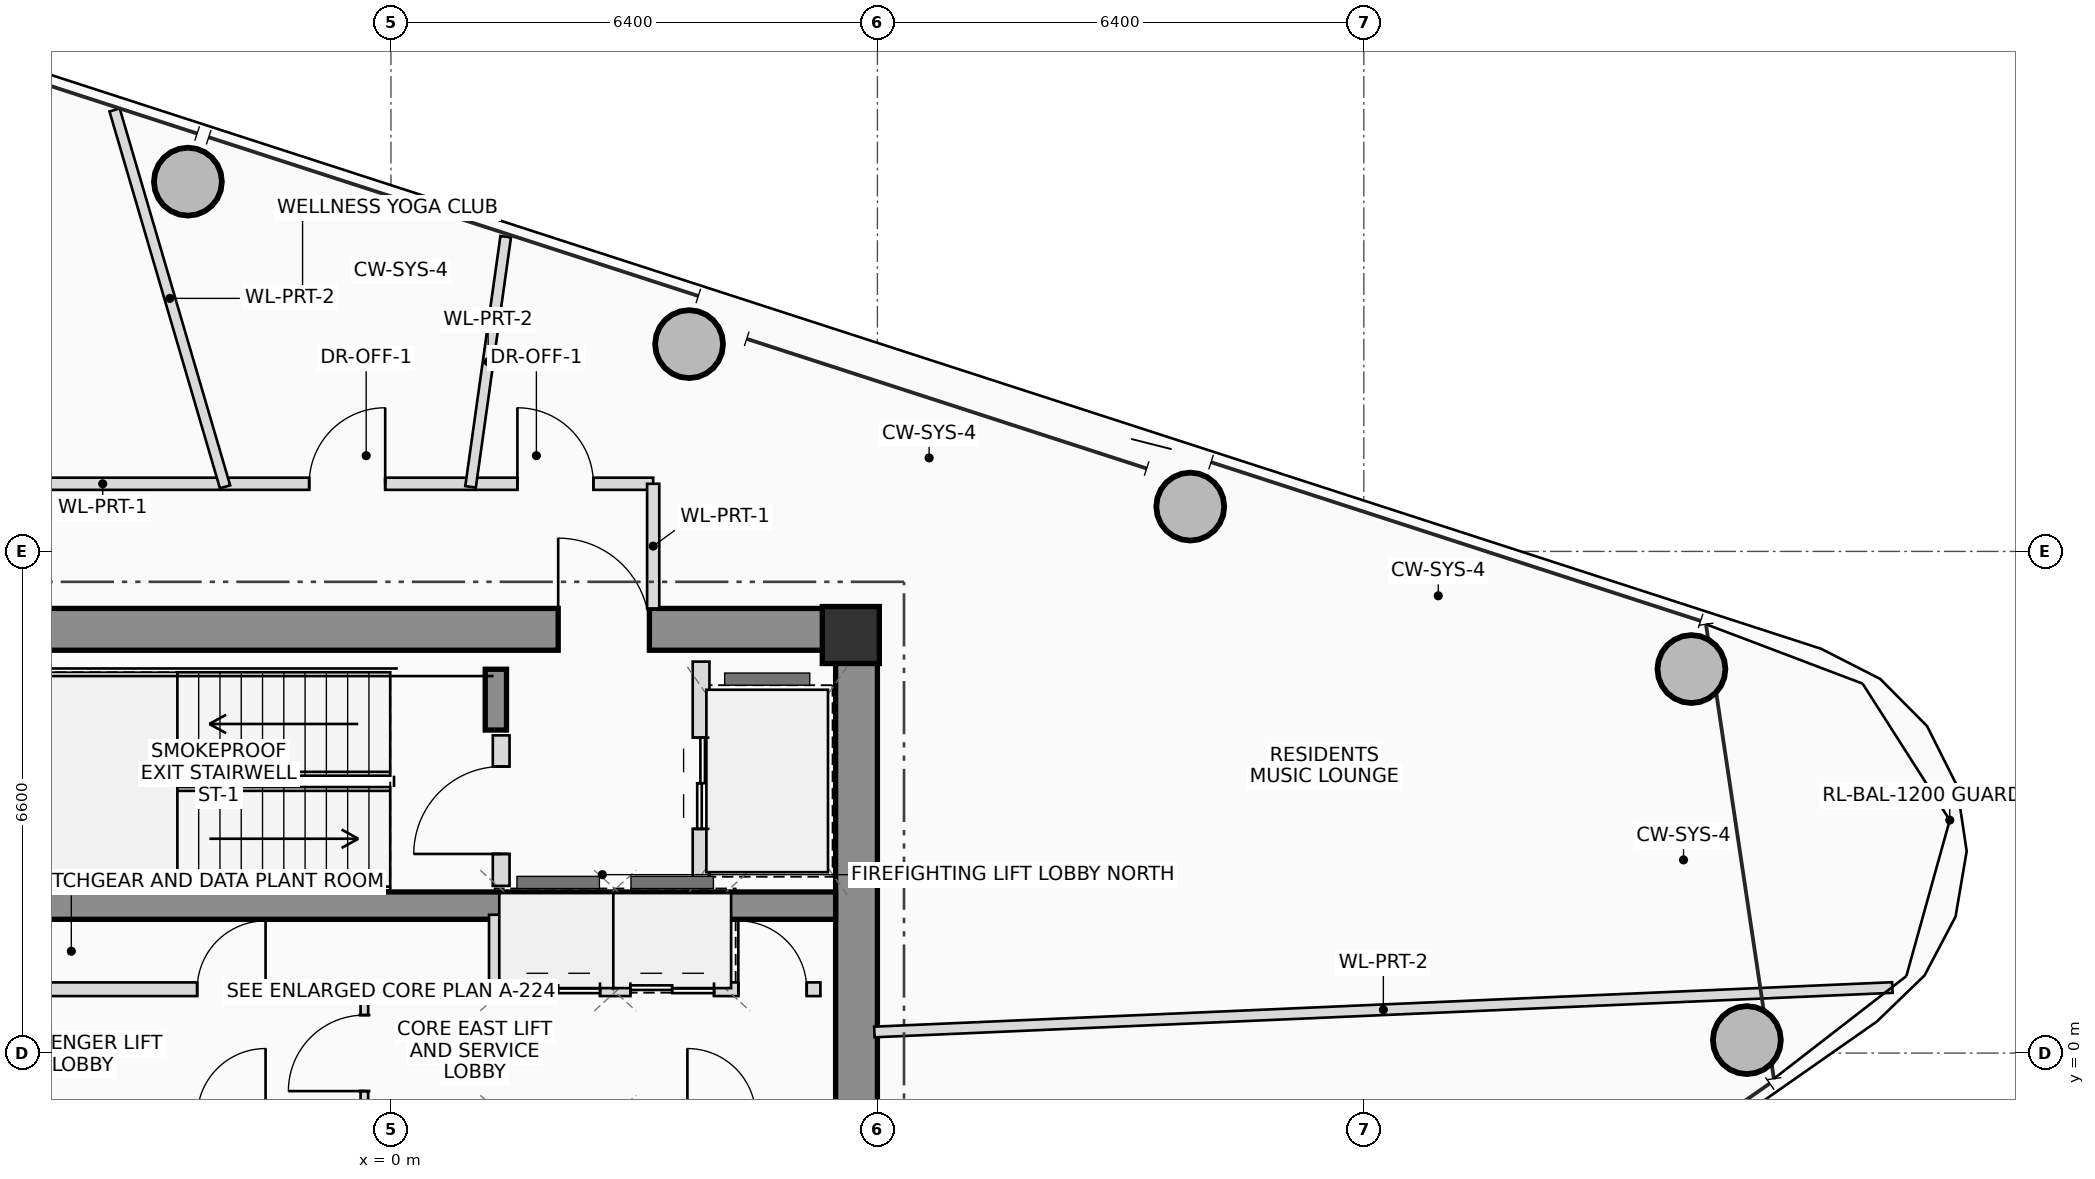
"""IFC4 building model, lengths in metres.
Left out: names, types, materials, properties, quantities, classifications, styles, units other than length and angle.
Written with IfcOpenShell. Run it as: python <this file> out.ifc"""

import sys

from ifc_helpers import new_model, si_unit, direction, frame, frame_2d, origin, origin_2d, place, context, subcontext, project, spatial, rectangle, hollow_circle, extrude, source, transform, mapped, element, fill, save


model = new_model("IFC4")
c1 = context("Model", 3, precision=1e-05, world=origin(), true_north=direction((0.0, 1.0)))
c2 = subcontext(c1, "Body", "Model", "MODEL_VIEW")
j1 = project(units=[si_unit("LENGTHUNIT", "METRE"), si_unit("PLANEANGLEUNIT", "RADIAN")], contexts=[c1])
p1 = place(None, origin())
s1 = spatial("IfcSite", under=j1, at=p1, CompositionType="ELEMENT")
p2 = place(p1, origin())
s2 = spatial("IfcBuilding", under=s1, at=p2, CompositionType="ELEMENT")
p3 = place(p2, frame((0.0, 0.0, 260.95)))
s3 = spatial("IfcBuildingStorey", under=s2, at=p3, CompositionType="ELEMENT", Elevation=260.95)
m1 = source(origin(), c2, "Body", "SweptSolid", [
    extrude(rectangle(XDim=0.75, YDim=0.75, at=origin_2d()), origin(), (0.0, 0.0, 1.0), 3.4),
])
p4 = place(p3, frame((6.05, 5.5, 0.0), z_axis=(0.0, 0.0, 1.0), x_axis=(1.0, 0.0, 0.0)))
e1 = element("IfcColumn", 1, at=p4, inside=s3, PredefinedType="COLUMN", context=c2, shape_type="MappedRepresentation", body=[
    mapped(m1, transform((0.0, 0.0, 0.0), scale=1.0)),
])
p5 = place(p3, frame((-6.4, 5.575, 0.0), z_axis=(0.0, 0.0, 1.0), x_axis=(1.0, 0.0, 0.0)))
e2 = element("IfcWall", 2, at=p5, inside=s3, PredefinedType="SHEAR", context=c2, shape_type="SweptSolid", body=[
    extrude(rectangle(XDim=12.8, YDim=0.55, at=frame_2d((6.4, 0.0))), origin(), (0.0, 0.0, 1.0), 3.4),
])
p6 = place(p5, frame((8.6, 0.0, 0.0)))
e3 = element("IfcOpeningElement", 3, at=p6, cuts=e2, PredefinedType="OPENING", context=c2, shape_type="SweptSolid", body=[
    extrude(rectangle(XDim=1.2, YDim=2.2, at=frame_2d((0.6, 1.1))), frame((0.0, 0.285, 0.0), z_axis=(0.0, -1.0, 0.0), x_axis=(1.0, 0.0, 0.0)), (0.0, 0.0, 1.0), 0.57),
])
p7 = place(p3, frame((6.125, -5.3, 0.0), z_axis=(0.0, 0.0, 1.0), x_axis=(0.0, 1.0, 0.0)))
e4 = element("IfcWall", 4, at=p7, inside=s3, PredefinedType="SHEAR", context=c2, shape_type="SweptSolid", body=[
    extrude(rectangle(XDim=10.6, YDim=0.55, at=frame_2d((5.3, 0.0))), origin(), (0.0, 0.0, 1.0), 3.4),
])
p8 = place(p3, frame((-5.85, 1.94, 0.0), z_axis=(0.0, 0.0, 1.0), x_axis=(1.0, 0.0, 0.0)))
e5 = element("IfcWall", 5, at=p8, inside=s3, PredefinedType="SHEAR", context=c2, shape_type="SweptSolid", body=[
    extrude(rectangle(XDim=11.7, YDim=0.36, at=frame_2d((5.85, 0.0))), origin(), (0.0, 0.0, 1.0), 3.4),
])
p9 = place(p3, frame((1.38, 4.25, 0.0), z_axis=(0.0, 0.0, 1.0), x_axis=(0.0, 1.0, 0.0)))
e6 = element("IfcWall", 6, at=p9, inside=s3, PredefinedType="SHEAR", context=c2, shape_type="SweptSolid", body=[
    extrude(rectangle(XDim=0.8, YDim=0.28, at=frame_2d((0.4, 0.0))), origin(), (0.0, 0.0, 1.0), 3.4),
])
m2 = source(origin(), c2, "Body", "SweptSolid", [
    extrude(hollow_circle(Radius=0.45, WallThickness=0.032, at=origin_2d()), origin(), (0.0, 0.0, 1.0), 3.4),
])
for number, where, z_axis, x_axis in (
    (7, (17.84, 0.171, 0.0), (0.0, 0.0, 1.0), (1.0, 0.0, 0.0)),
    (8, (17.11, 5.052, 0.0), (0.0, 0.0, 1.0), (1.0, 0.0, 0.0)),
    (9, (10.516, 7.19, 0.0), (0.0, 0.0, 1.0), (1.0, 0.0, 0.0)),
    (10, (3.922, 9.327, 0.0), (0.0, 0.0, 1.0), (1.0, 0.0, 0.0)),
    (11, (-2.672, 11.465, 0.0), (0.0, 0.0, 1.0), (1.0, 0.0, 0.0)),
):
    element("IfcColumn", number, at=place(p3, frame(where, z_axis=z_axis, x_axis=x_axis)), inside=s3, PredefinedType="COLUMN", context=c2, shape_type="MappedRepresentation", body=[
        mapped(m2, transform((0.0, 0.0, 0.0), scale=1.0)),
    ])
p10 = place(p3, frame((1.45, 2.2, 0.0), z_axis=(0.0, 0.0, 1.0), x_axis=(0.0, 1.0, 0.0)))
e12 = element("IfcWall", 12, at=p10, inside=s3, PredefinedType="PLUMBINGWALL", context=c2, shape_type="SweptSolid", body=[
    extrude(rectangle(XDim=1.98, YDim=0.22, at=frame_2d((0.99, 0.0))), origin(), (0.0, 0.0, 1.0), 3.2),
])
p11 = place(p10, frame((0.42, 0.0, 0.0)))
e13 = element("IfcOpeningElement", 13, at=p11, cuts=e12, PredefinedType="OPENING", context=c2, shape_type="SweptSolid", body=[
    extrude(rectangle(XDim=1.15, YDim=2.15, at=frame_2d((0.575, 1.075))), frame((0.0, 0.12, 0.0), z_axis=(0.0, -1.0, 0.0), x_axis=(1.0, 0.0, 0.0)), (0.0, 0.0, 1.0), 0.24),
])
p12 = place(p3, frame((4.08, 2.2, 0.0), z_axis=(0.0, 0.0, 1.0), x_axis=(0.0, 1.0, 0.0)))
e14 = element("IfcWall", 14, at=p12, inside=s3, PredefinedType="PLUMBINGWALL", context=c2, shape_type="SweptSolid", body=[
    extrude(rectangle(XDim=2.95, YDim=0.22, at=frame_2d((1.475, 0.0))), origin(), (0.0, 0.0, 1.0), 3.2),
])
p13 = place(p12, frame((0.75, 0.0, 0.0)))
e15 = element("IfcOpeningElement", 15, at=p13, cuts=e14, PredefinedType="OPENING", context=c2, shape_type="SweptSolid", body=[
    extrude(rectangle(XDim=1.2, YDim=2.25, at=frame_2d((0.6, 1.125))), frame((0.0, 0.12, 0.0), z_axis=(0.0, -1.0, 0.0), x_axis=(1.0, 0.0, 0.0)), (0.0, 0.0, 1.0), 0.24),
])
p14 = place(p3, frame((-0.35, -0.84, 0.0), z_axis=(0.0, 0.0, 1.0), x_axis=(0.0, 1.0, 0.0)))
e16 = element("IfcWall", 16, at=p14, inside=s3, PredefinedType="PARTITIONING", context=c2, shape_type="SweptSolid", body=[
    extrude(rectangle(XDim=1.68, YDim=0.1, at=frame_2d((0.84, 0.0))), origin(), (0.0, 0.0, 1.0), 3.2),
])
p15 = place(p14, frame((0.34, 0.0, 0.0)))
e17 = element("IfcOpeningElement", 17, at=p15, cuts=e16, PredefinedType="OPENING", context=c2, shape_type="SweptSolid", body=[
    extrude(rectangle(XDim=1.0, YDim=2.25, at=frame_2d((0.5, 1.125))), frame((0.0, 0.06, 0.0), z_axis=(0.0, -1.0, 0.0), x_axis=(1.0, 0.0, 0.0)), (0.0, 0.0, 1.0), 0.12),
])
for number, where, z_axis, x_axis in (
    (18, (1.38, 0.84, 0.0), (0.0, 0.0, 1.0), (0.0, 1.0, 0.0)),
    (19, (3.02, 0.84, 0.0), (0.0, 0.0, 1.0), (0.0, 1.0, 0.0)),
    (20, (4.38, 0.84, 0.0), (0.0, 0.0, 1.0), (0.0, 1.0, 0.0)),
):
    element("IfcWall", number, at=place(p3, frame(where, z_axis=z_axis, x_axis=x_axis)), inside=s3, PredefinedType="PLUMBINGWALL", context=c2, shape_type="SweptSolid", body=[
        extrude(rectangle(XDim=0.98, YDim=0.18, at=frame_2d((0.49, 0.0))), origin(), (0.0, 0.0, 1.0), 3.2),
    ])
p16 = place(p3, frame((-5.68, 0.84, 0.0), z_axis=(0.0, 0.0, 1.0), x_axis=(1.0, 0.0, 0.0)))
e21 = element("IfcWall", 21, at=p16, inside=s3, PredefinedType="PLUMBINGWALL", context=c2, shape_type="SweptSolid", body=[
    extrude(rectangle(XDim=11.33, YDim=0.18, at=frame_2d((5.665, 0.0))), origin(), (0.0, 0.0, 1.0), 3.2),
])
p17 = place(p16, frame((3.13, 0.0, 0.0)))
e22 = element("IfcOpeningElement", 22, at=p17, cuts=e21, PredefinedType="OPENING", context=c2, shape_type="SweptSolid", body=[
    extrude(rectangle(XDim=0.9, YDim=2.05, at=frame_2d((0.45, 1.025))), frame((0.0, 0.1, 0.0), z_axis=(0.0, -1.0, 0.0), x_axis=(1.0, 0.0, 0.0)), (0.0, 0.0, 1.0), 0.2),
])
p18 = place(p16, frame((7.33, 0.0, 0.0)))
e23 = element("IfcOpeningElement", 23, at=p18, cuts=e21, PredefinedType="OPENING", context=c2, shape_type="SweptSolid", body=[
    extrude(rectangle(XDim=1.1, YDim=2.2, at=frame_2d((0.55, 1.1))), frame((0.0, 0.1, 0.0), z_axis=(0.0, -1.0, 0.0), x_axis=(1.0, 0.0, 0.0)), (0.0, 0.0, 1.0), 0.2),
])
p19 = place(p16, frame((8.83, 0.0, 0.0)))
e24 = element("IfcOpeningElement", 24, at=p19, cuts=e21, PredefinedType="OPENING", context=c2, shape_type="SweptSolid", body=[
    extrude(rectangle(XDim=1.1, YDim=2.2, at=frame_2d((0.55, 1.1))), frame((0.0, 0.1, 0.0), z_axis=(0.0, -1.0, 0.0), x_axis=(1.0, 0.0, 0.0)), (0.0, 0.0, 1.0), 0.2),
])
p20 = place(p16, frame((10.25, 0.0, 0.0)))
e25 = element("IfcOpeningElement", 25, at=p20, cuts=e21, PredefinedType="OPENING", context=c2, shape_type="SweptSolid", body=[
    extrude(rectangle(XDim=0.9, YDim=2.05, at=frame_2d((0.45, 1.025))), frame((0.0, 0.1, 0.0), z_axis=(0.0, -1.0, 0.0), x_axis=(1.0, 0.0, 0.0)), (0.0, 0.0, 1.0), 0.2),
])
p21 = place(p3, frame((-6.36, 7.49, 0.0), z_axis=(0.0, 0.0, 1.0), x_axis=(1.0, 0.0, 0.0)))
e26 = element("IfcWall", 26, at=p21, inside=s3, PredefinedType="PARTITIONING", context=c2, shape_type="SweptSolid", body=[
    extrude(rectangle(XDim=9.81, YDim=0.16, at=frame_2d((4.905, 0.0))), origin(), (0.0, 0.0, 1.0), 2.605),
])
p22 = place(p21, frame((5.284, 0.0, 0.0)))
e27 = element("IfcOpeningElement", 27, at=p22, cuts=e26, PredefinedType="OPENING", context=c2, shape_type="SweptSolid", body=[
    extrude(rectangle(XDim=1.0, YDim=2.25, at=frame_2d((0.5, 1.125))), frame((0.0, 0.09, 0.0), z_axis=(0.0, -1.0, 0.0), x_axis=(1.0, 0.0, 0.0)), (0.0, 0.0, 1.0), 0.18),
])
p23 = place(p21, frame((8.023, 0.0, 0.0)))
e28 = element("IfcOpeningElement", 28, at=p23, cuts=e26, PredefinedType="OPENING", context=c2, shape_type="SweptSolid", body=[
    extrude(rectangle(XDim=1.0, YDim=2.25, at=frame_2d((0.5, 1.125))), frame((0.0, 0.09, 0.0), z_axis=(0.0, -1.0, 0.0), x_axis=(1.0, 0.0, 0.0)), (0.0, 0.0, 1.0), 0.18),
])
p24 = place(p3, frame((3.45, 7.49, 0.0), z_axis=(0.0, 0.0, 1.0), x_axis=(0.0, -1.0, 0.0)))
e29 = element("IfcWall", 29, at=p24, inside=s3, PredefinedType="PARTITIONING", context=c2, shape_type="SweptSolid", body=[
    extrude(rectangle(XDim=1.64, YDim=0.16, at=frame_2d((0.82, 0.0))), origin(), (0.0, 0.0, 1.0), 2.805),
])
p25 = place(p3, frame((6.36, 0.278, 0.0), z_axis=(0.0, 0.0, 1.0), x_axis=(0.999047617824, 0.043633213494, 0.0)))
e30 = element("IfcWall", 30, at=p25, inside=s3, PredefinedType="PARTITIONING", context=c2, shape_type="SweptSolid", body=[
    extrude(rectangle(XDim=13.406, YDim=0.14, at=frame_2d((6.703, 0.0))), origin(), (0.0, 0.0, 1.0), 2.605),
])
p26 = place(p3, frame((1.047, 7.45, 0.0), z_axis=(0.0, 0.0, 1.0), x_axis=(0.13916814145, 0.990268765743, 0.0)))
e31 = element("IfcWall", 31, at=p26, inside=s3, PredefinedType="PARTITIONING", context=c2, shape_type="SweptSolid", body=[
    extrude(rectangle(XDim=3.323, YDim=0.14, at=frame_2d((1.661, 0.0))), origin(), (0.0, 0.0, 1.0), 2.765),
])
p27 = place(p3, frame((-2.183, 7.45, 0.0), z_axis=(0.0, 0.0, 1.0), x_axis=(-0.281242676509, 0.95963667964, 0.0)))
e32 = element("IfcWall", 32, at=p27, inside=s3, PredefinedType="PARTITIONING", context=c2, shape_type="SweptSolid", body=[
    extrude(rectangle(XDim=5.167, YDim=0.14, at=frame_2d((2.583, 0.0))), origin(), (0.0, 0.0, 1.0), 2.605),
])
p28 = place(p6, origin())
e33 = element("IfcDoor", 33, at=p28, inside=s3, OperationType="SINGLE_SWING_LEFT", PredefinedType="DOOR", context=c2, shape_type="SweptSolid", body=[
    extrude(rectangle(XDim=1.2, YDim=2.2, at=frame_2d((0.6, 1.1))), frame((0.0, 0.025, 0.0), z_axis=(0.0, -1.0, 0.0), x_axis=(1.0, 0.0, 0.0)), (0.0, 0.0, 1.0), 0.05),
])
fill(e3, e33)
p29 = place(p11, origin())
e34 = element("IfcDoor", 34, at=p29, inside=s3, OperationType="SINGLE_SWING_LEFT", PredefinedType="DOOR", context=c2, shape_type="SweptSolid", body=[
    extrude(rectangle(XDim=1.15, YDim=2.15, at=frame_2d((0.575, 1.075))), frame((0.0, 0.025, 0.0), z_axis=(0.0, -1.0, 0.0), x_axis=(1.0, 0.0, 0.0)), (0.0, 0.0, 1.0), 0.05),
])
fill(e13, e34)
p30 = place(p13, origin())
e35 = element("IfcDoor", 35, at=p30, inside=s3, OperationType="DOUBLE_DOOR_SLIDING", PredefinedType="DOOR", context=c2, shape_type="SweptSolid", body=[
    extrude(rectangle(XDim=1.2, YDim=2.25, at=frame_2d((0.6, 1.125))), frame((0.0, 0.025, 0.0), z_axis=(0.0, -1.0, 0.0), x_axis=(1.0, 0.0, 0.0)), (0.0, 0.0, 1.0), 0.05),
])
fill(e15, e35)
p31 = place(p15, origin())
e36 = element("IfcDoor", 36, at=p31, inside=s3, OperationType="SINGLE_SWING_LEFT", PredefinedType="DOOR", context=c2, shape_type="SweptSolid", body=[
    extrude(rectangle(XDim=1.0, YDim=2.25, at=frame_2d((0.5, 1.125))), frame((0.0, 0.025, 0.0), z_axis=(0.0, -1.0, 0.0), x_axis=(1.0, 0.0, 0.0)), (0.0, 0.0, 1.0), 0.05),
])
fill(e17, e36)
p32 = place(p17, origin())
e37 = element("IfcDoor", 37, at=p32, inside=s3, OperationType="SINGLE_SWING_RIGHT", PredefinedType="DOOR", context=c2, shape_type="SweptSolid", body=[
    extrude(rectangle(XDim=0.9, YDim=2.05, at=frame_2d((0.45, 1.025))), frame((0.0, 0.025, 0.0), z_axis=(0.0, -1.0, 0.0), x_axis=(1.0, 0.0, 0.0)), (0.0, 0.0, 1.0), 0.05),
])
fill(e22, e37)
p33 = place(p18, origin())
e38 = element("IfcDoor", 38, at=p33, inside=s3, OperationType="DOUBLE_DOOR_SLIDING", PredefinedType="DOOR", context=c2, shape_type="SweptSolid", body=[
    extrude(rectangle(XDim=1.1, YDim=2.2, at=frame_2d((0.55, 1.1))), frame((0.0, 0.025, 0.0), z_axis=(0.0, -1.0, 0.0), x_axis=(1.0, 0.0, 0.0)), (0.0, 0.0, 1.0), 0.05),
])
fill(e23, e38)
p34 = place(p19, origin())
e39 = element("IfcDoor", 39, at=p34, inside=s3, OperationType="DOUBLE_DOOR_SLIDING", PredefinedType="DOOR", context=c2, shape_type="SweptSolid", body=[
    extrude(rectangle(XDim=1.1, YDim=2.2, at=frame_2d((0.55, 1.1))), frame((0.0, 0.025, 0.0), z_axis=(0.0, -1.0, 0.0), x_axis=(1.0, 0.0, 0.0)), (0.0, 0.0, 1.0), 0.05),
])
fill(e24, e39)
p35 = place(p20, origin())
e40 = element("IfcDoor", 40, at=p35, inside=s3, OperationType="SINGLE_SWING_LEFT", PredefinedType="DOOR", context=c2, shape_type="SweptSolid", body=[
    extrude(rectangle(XDim=0.9, YDim=2.05, at=frame_2d((0.45, 1.025))), frame((0.0, 0.025, 0.0), z_axis=(0.0, -1.0, 0.0), x_axis=(1.0, 0.0, 0.0)), (0.0, 0.0, 1.0), 0.05),
])
fill(e25, e40)
p36 = place(p22, origin())
e41 = element("IfcDoor", 41, at=p36, inside=s3, OperationType="SINGLE_SWING_RIGHT", PredefinedType="DOOR", context=c2, shape_type="SweptSolid", body=[
    extrude(rectangle(XDim=1.0, YDim=2.25, at=frame_2d((0.5, 1.125))), frame((0.0, 0.025, 0.0), z_axis=(0.0, -1.0, 0.0), x_axis=(1.0, 0.0, 0.0)), (0.0, 0.0, 1.0), 0.05),
])
fill(e27, e41)
p37 = place(p23, origin())
e42 = element("IfcDoor", 42, at=p37, inside=s3, OperationType="SINGLE_SWING_LEFT", PredefinedType="DOOR", context=c2, shape_type="SweptSolid", body=[
    extrude(rectangle(XDim=1.0, YDim=2.25, at=frame_2d((0.5, 1.125))), frame((0.0, 0.025, 0.0), z_axis=(0.0, -1.0, 0.0), x_axis=(1.0, 0.0, 0.0)), (0.0, 0.0, 1.0), 0.05),
])
fill(e28, e42)
save(model, sys.argv[1])
